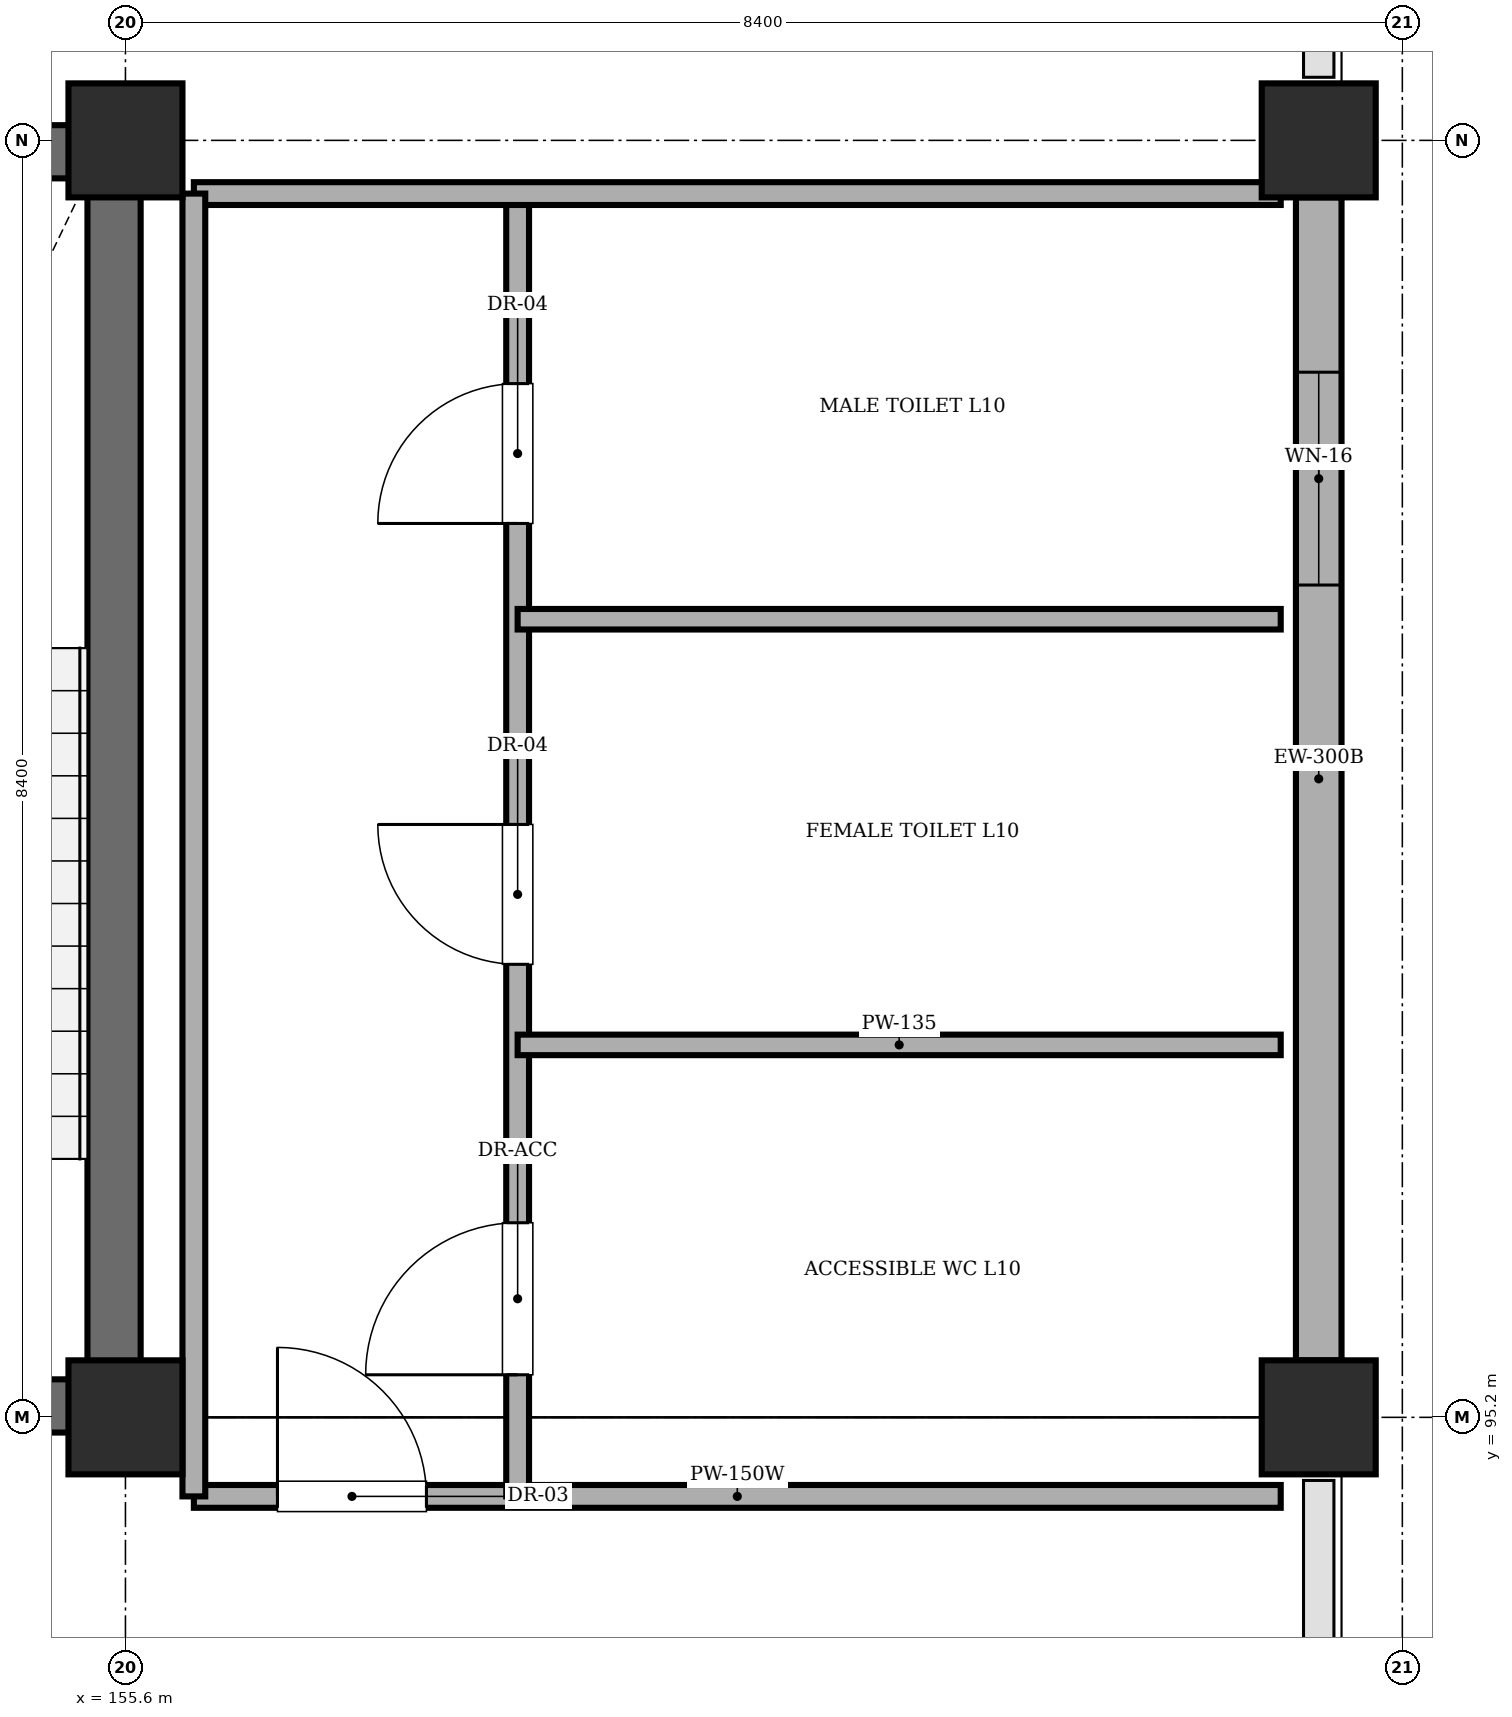
"""IFC4 building model, lengths in metres.
Left out: names, types, materials, properties, quantities, classifications, styles, units other than length and angle.
Written with IfcOpenShell. Run it as: python <this file> out.ifc"""

import sys

from ifc_helpers import new_model, si_unit, direction, frame, frame_2d, origin, origin_2d, place, context, subcontext, project, spatial, rectangle, extrude, element, fill, save


model = new_model("IFC4")
c1 = context("Model", 3, precision=1e-05, world=origin(), true_north=direction((0.0, 1.0)))
c2 = subcontext(c1, "Body", "Model", "MODEL_VIEW")
j1 = project(units=[si_unit("LENGTHUNIT", "METRE"), si_unit("PLANEANGLEUNIT", "RADIAN")], contexts=[c1])
p1 = place(None, origin())
s1 = spatial("IfcSite", under=j1, at=p1, CompositionType="ELEMENT")
p2 = place(p1, origin())
s2 = spatial("IfcBuilding", under=s1, at=p2, CompositionType="ELEMENT")
p3 = place(p2, frame((0.0, 0.0, 40.2)))
s3 = spatial("IfcBuildingStorey", under=s2, at=p3, CompositionType="ELEMENT", Elevation=40.2)
for number, where, z_axis, x_axis in (
    (1, (155.6, 95.2, 0.0), (0.0, 0.0, 1.0), (1.0, 0.0, 0.0)),
    (2, (155.6, 103.6, 0.0), (0.0, 0.0, 1.0), (1.0, 0.0, 0.0)),
    (3, (163.45, 95.2, 0.0), (0.0, 0.0, 1.0), (1.0, 0.0, 0.0)),
    (4, (163.45, 103.6, 0.0), (0.0, 0.0, 1.0), (1.0, 0.0, 0.0)),
):
    element("IfcColumn", number, at=place(p3, frame(where, z_axis=z_axis, x_axis=x_axis)), inside=s3, PredefinedType="COLUMN", context=c2, shape_type="SweptSolid", body=[
        extrude(rectangle(XDim=0.75, YDim=0.75, at=origin_2d()), origin(), (0.0, 0.0, 1.0), 4.0),
    ])
for number, where, z_axis, x_axis in (
    (5, (151.9, 95.275, 0.0), (0.0, 0.0, 1.0), (1.0, 0.0, 0.0)),
    (6, (151.9, 103.525, 0.0), (0.0, 0.0, 1.0), (1.0, 0.0, 0.0)),
):
    element("IfcWall", number, at=place(p3, frame(where, z_axis=z_axis, x_axis=x_axis)), inside=s3, PredefinedType="SHEAR", context=c2, shape_type="SweptSolid", body=[
        extrude(rectangle(XDim=3.8, YDim=0.35, at=frame_2d((1.9, 0.0))), origin(), (0.0, 0.0, 1.0), 4.0),
    ])
p4 = place(p3, frame((155.525, 95.45, 0.0), z_axis=(0.0, 0.0, 1.0), x_axis=(0.0, 1.0, 0.0)))
e7 = element("IfcWall", 7, at=p4, inside=s3, PredefinedType="SHEAR", context=c2, shape_type="SweptSolid", body=[
    extrude(rectangle(XDim=7.9, YDim=0.35, at=frame_2d((3.95, 0.0))), origin(), (0.0, 0.0, 1.0), 4.0),
])
p5 = place(p3, frame((163.45, 103.225, 0.0), z_axis=(0.0, 0.0, 1.0), x_axis=(0.0, -1.0, 0.0)))
e8 = element("IfcWall", 8, at=p5, inside=s3, PredefinedType="STANDARD", context=c2, shape_type="SweptSolid", body=[
    extrude(rectangle(XDim=7.65, YDim=0.3, at=frame_2d((3.825, 0.0))), origin(), (0.0, 0.0, 1.0), 3.3),
])
p6 = place(p5, frame((1.15, 0.0, 1.1)))
e9 = element("IfcOpeningElement", 9, at=p6, cuts=e8, PredefinedType="OPENING", context=c2, shape_type="SweptSolid", body=[
    extrude(rectangle(XDim=1.4, YDim=1.4, at=frame_2d((0.7, 0.7))), frame((0.0, 0.16, 0.0), z_axis=(0.0, -1.0, 0.0), x_axis=(1.0, 0.0, 0.0)), (0.0, 0.0, 1.0), 0.32),
])
p7 = place(p3, frame((156.05, 94.68, 0.0), z_axis=(0.0, 0.0, 1.0), x_axis=(1.0, 0.0, 0.0)))
e10 = element("IfcWall", 10, at=p7, inside=s3, PredefinedType="PARTITIONING", context=c2, shape_type="SweptSolid", body=[
    extrude(rectangle(XDim=7.15, YDim=0.15, at=frame_2d((3.575, 0.0))), origin(), (0.0, 0.0, 1.0), 4.0),
])
p8 = place(p7, frame((0.55, 0.0, 0.0)))
e11 = element("IfcOpeningElement", 11, at=p8, cuts=e10, PredefinedType="OPENING", context=c2, shape_type="SweptSolid", body=[
    extrude(rectangle(XDim=0.98, YDim=2.12, at=frame_2d((0.49, 1.06))), frame((0.0, 0.085, 0.0), z_axis=(0.0, -1.0, 0.0), x_axis=(1.0, 0.0, 0.0)), (0.0, 0.0, 1.0), 0.17),
])
p9 = place(p3, frame((158.18, 94.68, 0.0), z_axis=(0.0, 0.0, 1.0), x_axis=(0.0, 1.0, 0.0)))
e12 = element("IfcWall", 12, at=p9, inside=s3, PredefinedType="PARTITIONING", context=c2, shape_type="SweptSolid", body=[
    extrude(rectangle(XDim=8.57, YDim=0.15, at=frame_2d((4.285, 0.0))), origin(), (0.0, 0.0, 1.0), 4.0),
])
p10 = place(p9, frame((0.8, 0.0, 0.0)))
e13 = element("IfcOpeningElement", 13, at=p10, cuts=e12, PredefinedType="OPENING", context=c2, shape_type="SweptSolid", body=[
    extrude(rectangle(XDim=1.0, YDim=2.12, at=frame_2d((0.5, 1.06))), frame((0.0, 0.085, 0.0), z_axis=(0.0, -1.0, 0.0), x_axis=(1.0, 0.0, 0.0)), (0.0, 0.0, 1.0), 0.17),
])
p11 = place(p9, frame((3.5, 0.0, 0.0)))
e14 = element("IfcOpeningElement", 14, at=p11, cuts=e12, PredefinedType="OPENING", context=c2, shape_type="SweptSolid", body=[
    extrude(rectangle(XDim=0.92, YDim=2.1, at=frame_2d((0.46, 1.05))), frame((0.0, 0.085, 0.0), z_axis=(0.0, -1.0, 0.0), x_axis=(1.0, 0.0, 0.0)), (0.0, 0.0, 1.0), 0.17),
])
p12 = place(p9, frame((6.4, 0.0, 0.0)))
e15 = element("IfcOpeningElement", 15, at=p12, cuts=e12, PredefinedType="OPENING", context=c2, shape_type="SweptSolid", body=[
    extrude(rectangle(XDim=0.92, YDim=2.1, at=frame_2d((0.46, 1.05))), frame((0.0, 0.085, 0.0), z_axis=(0.0, -1.0, 0.0), x_axis=(1.0, 0.0, 0.0)), (0.0, 0.0, 1.0), 0.17),
])
for number, where, z_axis, x_axis in (
    (16, (158.18, 97.65, 0.0), (0.0, 0.0, 1.0), (1.0, 0.0, 0.0)),
    (17, (158.18, 100.45, 0.0), (0.0, 0.0, 1.0), (1.0, 0.0, 0.0)),
):
    element("IfcWall", number, at=place(p3, frame(where, z_axis=z_axis, x_axis=x_axis)), inside=s3, PredefinedType="PARTITIONING", context=c2, shape_type="SweptSolid", body=[
        extrude(rectangle(XDim=5.02, YDim=0.135, at=frame_2d((2.51, 0.0))), origin(), (0.0, 0.0, 1.0), 4.0),
    ])
p13 = place(p3, frame((156.05, 103.25, 0.0), z_axis=(0.0, 0.0, 1.0), x_axis=(1.0, 0.0, 0.0)))
e18 = element("IfcWall", 18, at=p13, inside=s3, PredefinedType="PARTITIONING", context=c2, shape_type="SweptSolid", body=[
    extrude(rectangle(XDim=7.15, YDim=0.15, at=frame_2d((3.575, 0.0))), origin(), (0.0, 0.0, 1.0), 4.0),
])
p14 = place(p3, frame((156.05, 94.68, 0.0), z_axis=(0.0, 0.0, 1.0), x_axis=(0.0, 1.0, 0.0)))
e19 = element("IfcWall", 19, at=p14, inside=s3, PredefinedType="PARTITIONING", context=c2, shape_type="SweptSolid", body=[
    extrude(rectangle(XDim=8.57, YDim=0.15, at=frame_2d((4.285, 0.0))), origin(), (0.0, 0.0, 1.0), 4.0),
])
p15 = place(p6, origin())
e20 = element("IfcWindow", 20, at=p15, inside=s3, PartitioningType="SINGLE_PANEL", PredefinedType="WINDOW", context=c2, shape_type="SweptSolid", body=[
    extrude(rectangle(XDim=1.4, YDim=1.4, at=frame_2d((0.7, 0.7))), frame((0.0, 0.03, 0.0), z_axis=(0.0, -1.0, 0.0), x_axis=(1.0, 0.0, 0.0)), (0.0, 0.0, 1.0), 0.06),
])
fill(e9, e20)
p16 = place(p8, origin())
e21 = element("IfcDoor", 21, at=p16, inside=s3, OperationType="SINGLE_SWING_LEFT", PredefinedType="DOOR", context=c2, shape_type="SweptSolid", body=[
    extrude(rectangle(XDim=0.98, YDim=2.12, at=frame_2d((0.49, 1.06))), frame((0.0, 0.025, 0.0), z_axis=(0.0, -1.0, 0.0), x_axis=(1.0, 0.0, 0.0)), (0.0, 0.0, 1.0), 0.05),
])
fill(e11, e21)
p17 = place(p10, origin())
e22 = element("IfcDoor", 22, at=p17, inside=s3, OperationType="SINGLE_SWING_LEFT", PredefinedType="DOOR", context=c2, shape_type="SweptSolid", body=[
    extrude(rectangle(XDim=1.0, YDim=2.12, at=frame_2d((0.5, 1.06))), frame((0.0, 0.025, 0.0), z_axis=(0.0, -1.0, 0.0), x_axis=(1.0, 0.0, 0.0)), (0.0, 0.0, 1.0), 0.05),
])
fill(e13, e22)
p18 = place(p11, origin())
e23 = element("IfcDoor", 23, at=p18, inside=s3, OperationType="SINGLE_SWING_RIGHT", PredefinedType="DOOR", context=c2, shape_type="SweptSolid", body=[
    extrude(rectangle(XDim=0.92, YDim=2.1, at=frame_2d((0.46, 1.05))), frame((0.0, 0.025, 0.0), z_axis=(0.0, -1.0, 0.0), x_axis=(1.0, 0.0, 0.0)), (0.0, 0.0, 1.0), 0.05),
])
fill(e14, e23)
p19 = place(p12, origin())
e24 = element("IfcDoor", 24, at=p19, inside=s3, OperationType="SINGLE_SWING_LEFT", PredefinedType="DOOR", context=c2, shape_type="SweptSolid", body=[
    extrude(rectangle(XDim=0.92, YDim=2.1, at=frame_2d((0.46, 1.05))), frame((0.0, 0.025, 0.0), z_axis=(0.0, -1.0, 0.0), x_axis=(1.0, 0.0, 0.0)), (0.0, 0.0, 1.0), 0.05),
])
fill(e15, e24)
save(model, sys.argv[1])
